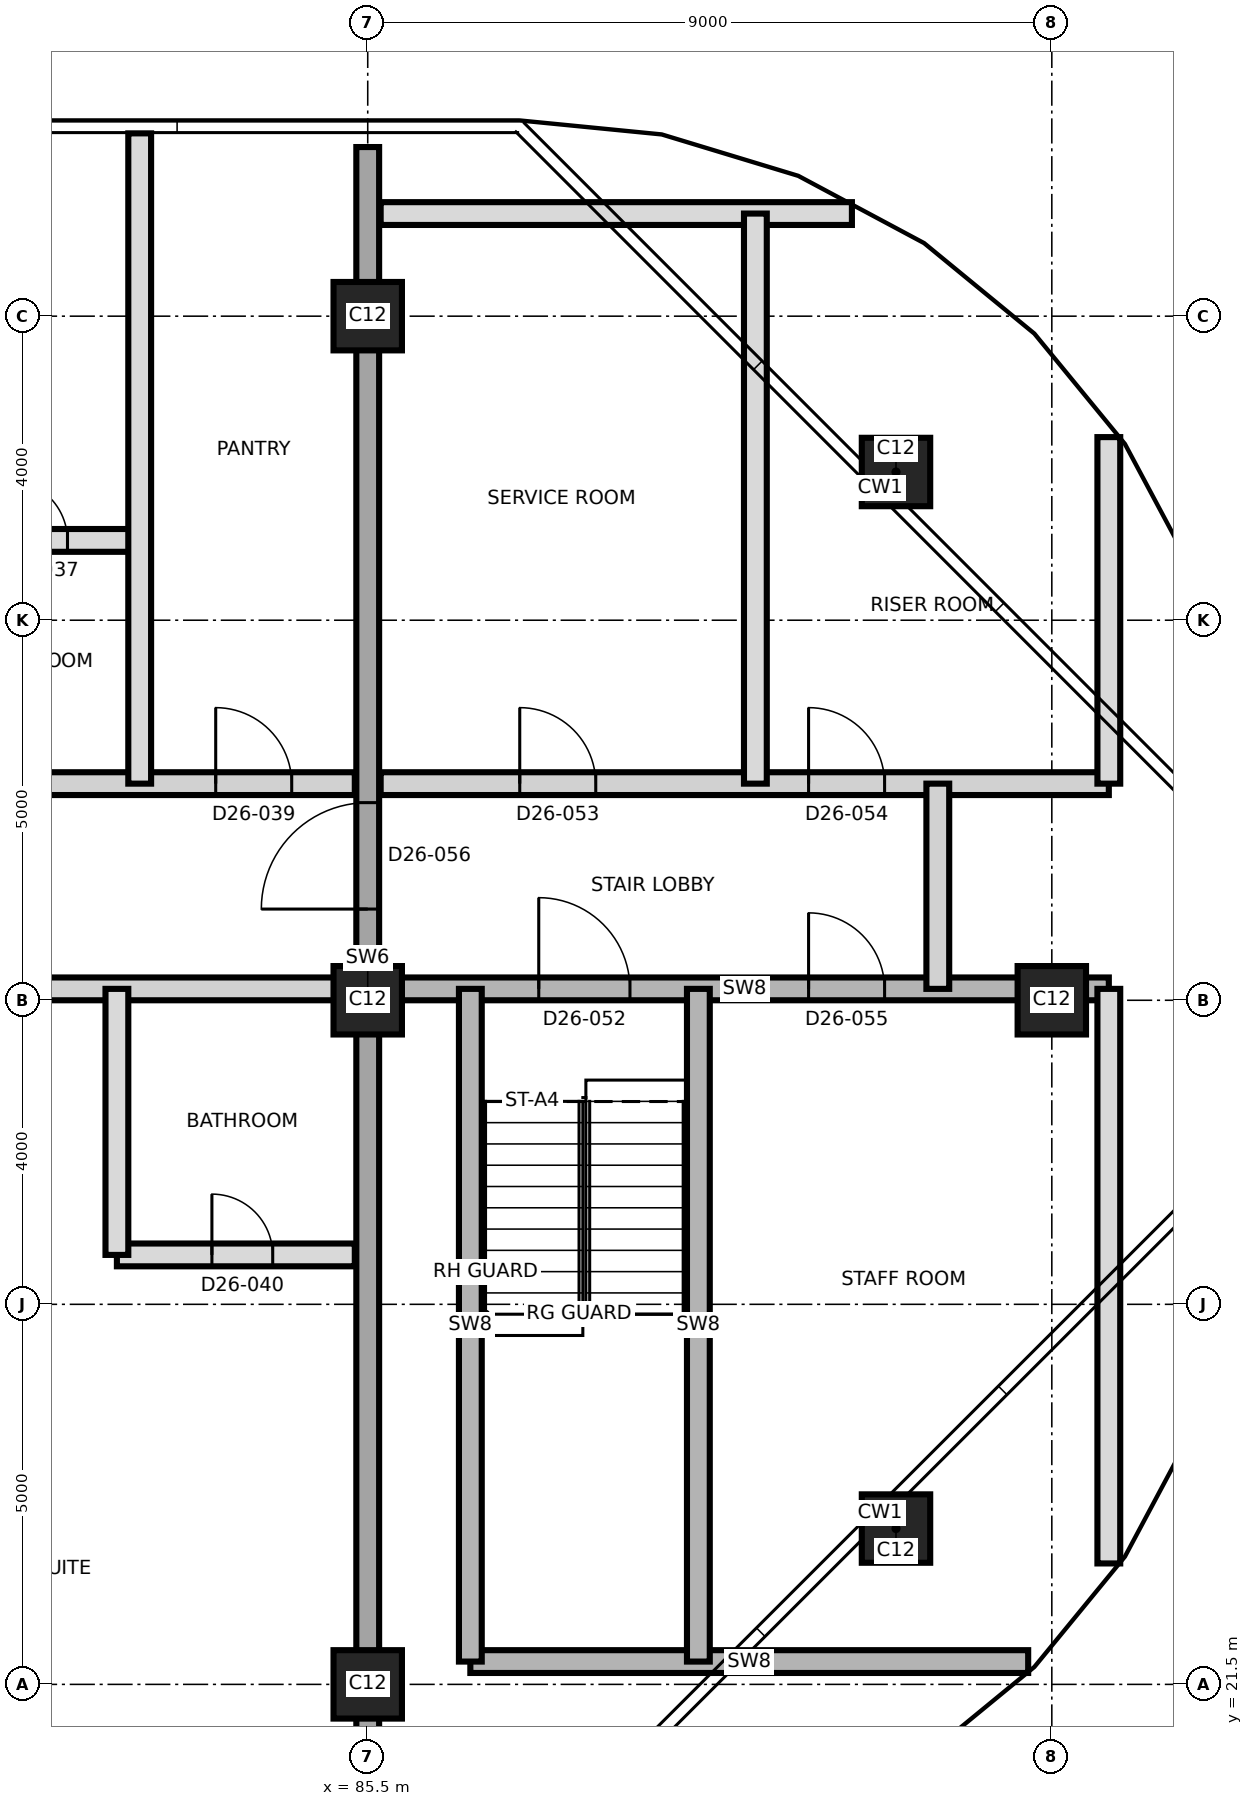
"""IFC4 building model, lengths in metres.
Left out: names, types, materials, properties, quantities, classifications, styles, units other than length and angle.
Written with IfcOpenShell. Run it as: python <this file> out.ifc"""

import sys

from ifc_helpers import new_model, si_unit, direction, frame, frame_2d, origin, origin_2d, place, context, subcontext, project, spatial, rectangle, extrude, element, fill, save


model = new_model("IFC4")
c1 = context("Model", 3, precision=1e-05, world=origin(), true_north=direction((0.0, 1.0)))
c2 = subcontext(c1, "Body", "Model", "MODEL_VIEW")
j1 = project(units=[si_unit("LENGTHUNIT", "METRE"), si_unit("PLANEANGLEUNIT", "RADIAN")], contexts=[c1])
p1 = place(None, origin())
s1 = spatial("IfcSite", under=j1, at=p1, CompositionType="ELEMENT")
p2 = place(p1, origin())
s2 = spatial("IfcBuilding", under=s1, at=p2, CompositionType="ELEMENT")
p3 = place(p2, frame((0.0, 0.0, 232.8)))
s3 = spatial("IfcBuildingStorey", under=s2, at=p3, CompositionType="ELEMENT", Elevation=232.8)
for number, where, z_axis, x_axis in (
    (1, (85.5, 21.5, 0.0), (0.0, 0.0, 1.0), (1.0, 0.0, 0.0)),
    (2, (92.45, 23.55, 0.0), (0.0, 0.0, 1.0), (1.0, 0.0, 0.0)),
    (3, (85.5, 30.5, 0.0), (0.0, 0.0, 1.0), (1.0, 0.0, 0.0)),
    (4, (94.5, 30.5, 0.0), (0.0, 0.0, 1.0), (1.0, 0.0, 0.0)),
    (5, (92.45, 37.45, 0.0), (0.0, 0.0, 1.0), (1.0, 0.0, 0.0)),
    (6, (85.5, 39.5, 0.0), (0.0, 0.0, 1.0), (1.0, 0.0, 0.0)),
):
    element("IfcColumn", number, at=place(p3, frame(where, z_axis=z_axis, x_axis=x_axis)), inside=s3, PredefinedType="COLUMN", context=c2, shape_type="SweptSolid", body=[
        extrude(rectangle(XDim=0.9, YDim=0.9, at=origin_2d()), origin(), (0.0, 0.0, 1.0), 3.7),
    ])
p4 = place(p3, frame((85.5, 19.275, 0.0), z_axis=(0.0, 0.0, 1.0), x_axis=(0.0, 1.0, 0.0)))
e7 = element("IfcWall", 7, at=p4, inside=s3, PredefinedType="SHEAR", context=c2, shape_type="SweptSolid", body=[
    extrude(rectangle(XDim=22.45, YDim=0.3, at=frame_2d((11.225, 0.0))), origin(), (0.0, 0.0, 1.0), 3.7),
])
p5 = place(p4, frame((12.425, 0.0, 0.0)))
e8 = element("IfcOpeningElement", 8, at=p5, cuts=e7, PredefinedType="OPENING", context=c2, shape_type="SweptSolid", body=[
    extrude(rectangle(XDim=1.4, YDim=2.1, at=frame_2d((0.7, 1.05))), frame((0.0, 0.16, 0.0), z_axis=(0.0, -1.0, 0.0), x_axis=(1.0, 0.0, 0.0)), (0.0, 0.0, 1.0), 0.32),
])
p6 = place(p3, frame((86.85, 21.8, 0.0), z_axis=(0.0, 0.0, 1.0), x_axis=(1.0, 0.0, 0.0)))
e9 = element("IfcWall", 9, at=p6, inside=s3, PredefinedType="SHEAR", context=c2, shape_type="SweptSolid", body=[
    extrude(rectangle(XDim=7.339, YDim=0.3, at=frame_2d((3.669, 0.0))), origin(), (0.0, 0.0, 1.0), 3.4),
])
p7 = place(p3, frame((82.2, 27.15, 0.0), z_axis=(0.0, 0.0, 1.0), x_axis=(1.0, 0.0, 0.0)))
e10 = element("IfcWall", 10, at=p7, inside=s3, PredefinedType="PARTITIONING", context=c2, shape_type="SweptSolid", body=[
    extrude(rectangle(XDim=3.13, YDim=0.3, at=frame_2d((1.565, 0.0))), origin(), (0.0, 0.0, 1.0), 3.4),
])
p8 = place(p7, frame((1.25, 0.0, 0.0)))
e11 = element("IfcOpeningElement", 11, at=p8, cuts=e10, PredefinedType="OPENING", context=c2, shape_type="SweptSolid", body=[
    extrude(rectangle(XDim=0.8, YDim=2.1, at=frame_2d((0.4, 1.05))), frame((0.0, 0.16, 0.0), z_axis=(0.0, -1.0, 0.0), x_axis=(1.0, 0.0, 0.0)), (0.0, 0.0, 1.0), 0.32),
])
p9 = place(p3, frame((58.55, 30.65, 0.0), z_axis=(0.0, 0.0, 1.0), x_axis=(1.0, 0.0, 0.0)))
e12 = element("IfcWall", 12, at=p9, inside=s3, PredefinedType="PARTITIONING", context=c2, shape_type="SweptSolid", body=[
    extrude(rectangle(XDim=26.78, YDim=0.3, at=frame_2d((13.39, 0.0))), origin(), (0.0, 0.0, 1.0), 3.4),
])
p10 = place(p9, frame((1.085, 0.0, 0.0)))
e13 = element("IfcOpeningElement", 13, at=p10, cuts=e12, PredefinedType="OPENING", context=c2, shape_type="SweptSolid", body=[
    extrude(rectangle(XDim=1.2, YDim=2.1, at=frame_2d((0.6, 1.05))), frame((0.0, 0.16, 0.0), z_axis=(0.0, -1.0, 0.0), x_axis=(1.0, 0.0, 0.0)), (0.0, 0.0, 1.0), 0.32),
])
p11 = place(p9, frame((4.335, 0.0, 0.0)))
e14 = element("IfcOpeningElement", 14, at=p11, cuts=e12, PredefinedType="OPENING", context=c2, shape_type="SweptSolid", body=[
    extrude(rectangle(XDim=1.0, YDim=2.1, at=frame_2d((0.5, 1.05))), frame((0.0, 0.16, 0.0), z_axis=(0.0, -1.0, 0.0), x_axis=(1.0, 0.0, 0.0)), (0.0, 0.0, 1.0), 0.32),
])
p12 = place(p9, frame((14.6, 0.0, 0.0)))
e15 = element("IfcOpeningElement", 15, at=p12, cuts=e12, PredefinedType="OPENING", context=c2, shape_type="SweptSolid", body=[
    extrude(rectangle(XDim=1.0, YDim=2.4, at=frame_2d((0.5, 1.2))), frame((0.0, 0.16, 0.0), z_axis=(0.0, -1.0, 0.0), x_axis=(1.0, 0.0, 0.0)), (0.0, 0.0, 1.0), 0.32),
])
p13 = place(p9, frame((20.3, 0.0, 0.0)))
e16 = element("IfcOpeningElement", 16, at=p13, cuts=e12, PredefinedType="OPENING", context=c2, shape_type="SweptSolid", body=[
    extrude(rectangle(XDim=1.0, YDim=2.4, at=frame_2d((0.5, 1.2))), frame((0.0, 0.16, 0.0), z_axis=(0.0, -1.0, 0.0), x_axis=(1.0, 0.0, 0.0)), (0.0, 0.0, 1.0), 0.32),
])
p14 = place(p3, frame((85.67, 30.65, 0.0), z_axis=(0.0, 0.0, 1.0), x_axis=(1.0, 0.0, 0.0)))
e17 = element("IfcWall", 17, at=p14, inside=s3, PredefinedType="SHEAR", context=c2, shape_type="SweptSolid", body=[
    extrude(rectangle(XDim=9.58, YDim=0.3, at=frame_2d((4.79, 0.0))), origin(), (0.0, 0.0, 1.0), 3.4),
])
p15 = place(p14, frame((2.08, 0.0, 0.0)))
e18 = element("IfcOpeningElement", 18, at=p15, cuts=e17, PredefinedType="OPENING", context=c2, shape_type="SweptSolid", body=[
    extrude(rectangle(XDim=1.2, YDim=2.1, at=frame_2d((0.6, 1.05))), frame((0.0, 0.16, 0.0), z_axis=(0.0, -1.0, 0.0), x_axis=(1.0, 0.0, 0.0)), (0.0, 0.0, 1.0), 0.32),
])
p16 = place(p14, frame((5.63, 0.0, 0.0)))
e19 = element("IfcOpeningElement", 19, at=p16, cuts=e17, PredefinedType="OPENING", context=c2, shape_type="SweptSolid", body=[
    extrude(rectangle(XDim=1.0, YDim=2.1, at=frame_2d((0.5, 1.05))), frame((0.0, 0.16, 0.0), z_axis=(0.0, -1.0, 0.0), x_axis=(1.0, 0.0, 0.0)), (0.0, 0.0, 1.0), 0.32),
])
p17 = place(p3, frame((58.55, 33.35, 0.0), z_axis=(0.0, 0.0, 1.0), x_axis=(1.0, 0.0, 0.0)))
e20 = element("IfcWall", 20, at=p17, inside=s3, PredefinedType="PARTITIONING", context=c2, shape_type="SweptSolid", body=[
    extrude(rectangle(XDim=26.78, YDim=0.3, at=frame_2d((13.39, 0.0))), origin(), (0.0, 0.0, 1.0), 3.4),
])
p18 = place(p17, frame((3.95, 0.0, 0.0)))
e21 = element("IfcOpeningElement", 21, at=p18, cuts=e20, PredefinedType="OPENING", context=c2, shape_type="SweptSolid", body=[
    extrude(rectangle(XDim=1.0, YDim=2.4, at=frame_2d((0.5, 1.2))), frame((0.0, 0.16, 0.0), z_axis=(0.0, -1.0, 0.0), x_axis=(1.0, 0.0, 0.0)), (0.0, 0.0, 1.0), 0.32),
])
p19 = place(p17, frame((12.365, 0.0, 0.0)))
e22 = element("IfcOpeningElement", 22, at=p19, cuts=e20, PredefinedType="OPENING", context=c2, shape_type="SweptSolid", body=[
    extrude(rectangle(XDim=1.0, YDim=2.1, at=frame_2d((0.5, 1.05))), frame((0.0, 0.16, 0.0), z_axis=(0.0, -1.0, 0.0), x_axis=(1.0, 0.0, 0.0)), (0.0, 0.0, 1.0), 0.32),
])
p20 = place(p17, frame((15.315, 0.0, 0.0)))
e23 = element("IfcOpeningElement", 23, at=p20, cuts=e20, PredefinedType="OPENING", context=c2, shape_type="SweptSolid", body=[
    extrude(rectangle(XDim=1.4, YDim=2.1, at=frame_2d((0.7, 1.05))), frame((0.0, 0.16, 0.0), z_axis=(0.0, -1.0, 0.0), x_axis=(1.0, 0.0, 0.0)), (0.0, 0.0, 1.0), 0.32),
])
p21 = place(p17, frame((19.1, 0.0, 0.0)))
e24 = element("IfcOpeningElement", 24, at=p21, cuts=e20, PredefinedType="OPENING", context=c2, shape_type="SweptSolid", body=[
    extrude(rectangle(XDim=1.0, YDim=2.1, at=frame_2d((0.5, 1.05))), frame((0.0, 0.16, 0.0), z_axis=(0.0, -1.0, 0.0), x_axis=(1.0, 0.0, 0.0)), (0.0, 0.0, 1.0), 0.32),
])
p22 = place(p17, frame((24.95, 0.0, 0.0)))
e25 = element("IfcOpeningElement", 25, at=p22, cuts=e20, PredefinedType="OPENING", context=c2, shape_type="SweptSolid", body=[
    extrude(rectangle(XDim=1.0, YDim=2.1, at=frame_2d((0.5, 1.05))), frame((0.0, 0.16, 0.0), z_axis=(0.0, -1.0, 0.0), x_axis=(1.0, 0.0, 0.0)), (0.0, 0.0, 1.0), 0.32),
])
p23 = place(p3, frame((85.67, 33.35, 0.0), z_axis=(0.0, 0.0, 1.0), x_axis=(1.0, 0.0, 0.0)))
e26 = element("IfcWall", 26, at=p23, inside=s3, PredefinedType="PARTITIONING", context=c2, shape_type="SweptSolid", body=[
    extrude(rectangle(XDim=9.58, YDim=0.3, at=frame_2d((4.79, 0.0))), origin(), (0.0, 0.0, 1.0), 3.4),
])
p24 = place(p23, frame((1.83, 0.0, 0.0)))
e27 = element("IfcOpeningElement", 27, at=p24, cuts=e26, PredefinedType="OPENING", context=c2, shape_type="SweptSolid", body=[
    extrude(rectangle(XDim=1.0, YDim=2.1, at=frame_2d((0.5, 1.05))), frame((0.0, 0.16, 0.0), z_axis=(0.0, -1.0, 0.0), x_axis=(1.0, 0.0, 0.0)), (0.0, 0.0, 1.0), 0.32),
])
p25 = place(p23, frame((5.63, 0.0, 0.0)))
e28 = element("IfcOpeningElement", 28, at=p25, cuts=e26, PredefinedType="OPENING", context=c2, shape_type="SweptSolid", body=[
    extrude(rectangle(XDim=1.0, YDim=2.1, at=frame_2d((0.5, 1.05))), frame((0.0, 0.16, 0.0), z_axis=(0.0, -1.0, 0.0), x_axis=(1.0, 0.0, 0.0)), (0.0, 0.0, 1.0), 0.32),
])
p26 = place(p3, frame((79.8, 36.55, 0.0), z_axis=(0.0, 0.0, 1.0), x_axis=(1.0, 0.0, 0.0)))
e29 = element("IfcWall", 29, at=p26, inside=s3, PredefinedType="PARTITIONING", context=c2, shape_type="SweptSolid", body=[
    extrude(rectangle(XDim=2.7, YDim=0.3, at=frame_2d((1.35, 0.0))), origin(), (0.0, 0.0, 1.0), 3.4),
])
p27 = place(p26, frame((0.95, 0.0, 0.0)))
e30 = element("IfcOpeningElement", 30, at=p27, cuts=e29, PredefinedType="OPENING", context=c2, shape_type="SweptSolid", body=[
    extrude(rectangle(XDim=0.8, YDim=2.1, at=frame_2d((0.4, 1.05))), frame((0.0, 0.16, 0.0), z_axis=(0.0, -1.0, 0.0), x_axis=(1.0, 0.0, 0.0)), (0.0, 0.0, 1.0), 0.32),
])
p28 = place(p3, frame((85.67, 40.85, 0.0), z_axis=(0.0, 0.0, 1.0), x_axis=(1.0, 0.0, 0.0)))
e31 = element("IfcWall", 31, at=p28, inside=s3, PredefinedType="PARTITIONING", context=c2, shape_type="SweptSolid", body=[
    extrude(rectangle(XDim=6.2, YDim=0.3, at=frame_2d((3.1, 0.0))), origin(), (0.0, 0.0, 1.0), 3.4),
])
p29 = place(p3, frame((82.2, 27.15, 0.0), z_axis=(0.0, 0.0, 1.0), x_axis=(0.0, 1.0, 0.0)))
e32 = element("IfcWall", 32, at=p29, inside=s3, PredefinedType="PARTITIONING", context=c2, shape_type="SweptSolid", body=[
    extrude(rectangle(XDim=3.5, YDim=0.3, at=frame_2d((1.75, 0.0))), origin(), (0.0, 0.0, 1.0), 3.4),
])
p30 = place(p3, frame((82.5, 33.35, 0.0), z_axis=(0.0, 0.0, 1.0), x_axis=(0.0, 1.0, 0.0)))
e33 = element("IfcWall", 33, at=p30, inside=s3, PredefinedType="PARTITIONING", context=c2, shape_type="SweptSolid", body=[
    extrude(rectangle(XDim=8.555, YDim=0.3, at=frame_2d((4.277, 0.0))), origin(), (0.0, 0.0, 1.0), 3.4),
])
for number, where, z_axis, x_axis in (
    (34, (86.85, 21.8, 0.0), (0.0, 0.0, 1.0), (0.0, 1.0, 0.0)),
    (35, (89.85, 21.8, 0.0), (0.0, 0.0, 1.0), (0.0, 1.0, 0.0)),
):
    element("IfcWall", number, at=place(p3, frame(where, z_axis=z_axis, x_axis=x_axis)), inside=s3, PredefinedType="SHEAR", context=c2, shape_type="SweptSolid", body=[
        extrude(rectangle(XDim=8.85, YDim=0.3, at=frame_2d((4.425, 0.0))), origin(), (0.0, 0.0, 1.0), 3.4),
    ])
p31 = place(p3, frame((90.6, 33.35, 0.0), z_axis=(0.0, 0.0, 1.0), x_axis=(0.0, 1.0, 0.0)))
e36 = element("IfcWall", 36, at=p31, inside=s3, PredefinedType="PARTITIONING", context=c2, shape_type="SweptSolid", body=[
    extrude(rectangle(XDim=7.5, YDim=0.3, at=frame_2d((3.75, 0.0))), origin(), (0.0, 0.0, 1.0), 3.4),
])
p32 = place(p3, frame((93.0, 30.65, 0.0), z_axis=(0.0, 0.0, 1.0), x_axis=(0.0, 1.0, 0.0)))
e37 = element("IfcWall", 37, at=p32, inside=s3, PredefinedType="PARTITIONING", context=c2, shape_type="SweptSolid", body=[
    extrude(rectangle(XDim=2.7, YDim=0.3, at=frame_2d((1.35, 0.0))), origin(), (0.0, 0.0, 1.0), 3.4),
])
p33 = place(p3, frame((95.25, 23.091, 0.0), z_axis=(0.0, 0.0, 1.0), x_axis=(0.0, 1.0, 0.0)))
e38 = element("IfcWall", 38, at=p33, inside=s3, PredefinedType="PARTITIONING", context=c2, shape_type="SweptSolid", body=[
    extrude(rectangle(XDim=7.559, YDim=0.3, at=frame_2d((3.779, 0.0))), origin(), (0.0, 0.0, 1.0), 3.4),
])
p34 = place(p3, frame((95.25, 33.35, 0.0), z_axis=(0.0, 0.0, 1.0), x_axis=(0.0, 1.0, 0.0)))
e39 = element("IfcWall", 39, at=p34, inside=s3, PredefinedType="PARTITIONING", context=c2, shape_type="SweptSolid", body=[
    extrude(rectangle(XDim=4.559, YDim=0.3, at=frame_2d((2.279, 0.0))), origin(), (0.0, 0.0, 1.0), 3.4),
])
p35 = place(p27, origin())
e40 = element("IfcDoor", 40, at=p35, inside=s3, OperationType="SINGLE_SWING_LEFT", PredefinedType="DOOR", context=c2, shape_type="SweptSolid", body=[
    extrude(rectangle(XDim=0.8, YDim=2.1, at=frame_2d((0.4, 1.05))), frame((0.0, 0.025, 0.0), z_axis=(0.0, -1.0, 0.0), x_axis=(1.0, 0.0, 0.0)), (0.0, 0.0, 1.0), 0.05),
])
fill(e30, e40)
p36 = place(p22, origin())
e41 = element("IfcDoor", 41, at=p36, inside=s3, OperationType="SINGLE_SWING_LEFT", PredefinedType="DOOR", context=c2, shape_type="SweptSolid", body=[
    extrude(rectangle(XDim=1.0, YDim=2.1, at=frame_2d((0.5, 1.05))), frame((0.0, 0.025, 0.0), z_axis=(0.0, -1.0, 0.0), x_axis=(1.0, 0.0, 0.0)), (0.0, 0.0, 1.0), 0.05),
])
fill(e25, e41)
p37 = place(p8, origin())
e42 = element("IfcDoor", 42, at=p37, inside=s3, OperationType="SINGLE_SWING_LEFT", PredefinedType="DOOR", context=c2, shape_type="SweptSolid", body=[
    extrude(rectangle(XDim=0.8, YDim=2.1, at=frame_2d((0.4, 1.05))), frame((0.0, 0.025, 0.0), z_axis=(0.0, -1.0, 0.0), x_axis=(1.0, 0.0, 0.0)), (0.0, 0.0, 1.0), 0.05),
])
fill(e11, e42)
p38 = place(p15, origin())
e43 = element("IfcDoor", 43, at=p38, inside=s3, OperationType="SINGLE_SWING_LEFT", PredefinedType="DOOR", context=c2, shape_type="SweptSolid", body=[
    extrude(rectangle(XDim=1.2, YDim=2.1, at=frame_2d((0.6, 1.05))), frame((0.0, 0.025, 0.0), z_axis=(0.0, -1.0, 0.0), x_axis=(1.0, 0.0, 0.0)), (0.0, 0.0, 1.0), 0.05),
])
fill(e18, e43)
p39 = place(p24, origin())
e44 = element("IfcDoor", 44, at=p39, inside=s3, OperationType="SINGLE_SWING_LEFT", PredefinedType="DOOR", context=c2, shape_type="SweptSolid", body=[
    extrude(rectangle(XDim=1.0, YDim=2.1, at=frame_2d((0.5, 1.05))), frame((0.0, 0.025, 0.0), z_axis=(0.0, -1.0, 0.0), x_axis=(1.0, 0.0, 0.0)), (0.0, 0.0, 1.0), 0.05),
])
fill(e27, e44)
p40 = place(p25, origin())
e45 = element("IfcDoor", 45, at=p40, inside=s3, OperationType="SINGLE_SWING_RIGHT", PredefinedType="DOOR", context=c2, shape_type="SweptSolid", body=[
    extrude(rectangle(XDim=1.0, YDim=2.1, at=frame_2d((0.5, 1.05))), frame((0.0, 0.025, 0.0), z_axis=(0.0, -1.0, 0.0), x_axis=(1.0, 0.0, 0.0)), (0.0, 0.0, 1.0), 0.05),
])
fill(e28, e45)
p41 = place(p16, origin())
e46 = element("IfcDoor", 46, at=p41, inside=s3, OperationType="SINGLE_SWING_LEFT", PredefinedType="DOOR", context=c2, shape_type="SweptSolid", body=[
    extrude(rectangle(XDim=1.0, YDim=2.1, at=frame_2d((0.5, 1.05))), frame((0.0, 0.025, 0.0), z_axis=(0.0, -1.0, 0.0), x_axis=(1.0, 0.0, 0.0)), (0.0, 0.0, 1.0), 0.05),
])
fill(e19, e46)
p42 = place(p5, origin())
e47 = element("IfcDoor", 47, at=p42, inside=s3, OperationType="SINGLE_SWING_RIGHT", PredefinedType="DOOR", context=c2, shape_type="SweptSolid", body=[
    extrude(rectangle(XDim=1.4, YDim=2.1, at=frame_2d((0.7, 1.05))), frame((0.0, 0.025, 0.0), z_axis=(0.0, -1.0, 0.0), x_axis=(1.0, 0.0, 0.0)), (0.0, 0.0, 1.0), 0.05),
])
fill(e8, e47)
save(model, sys.argv[1])
